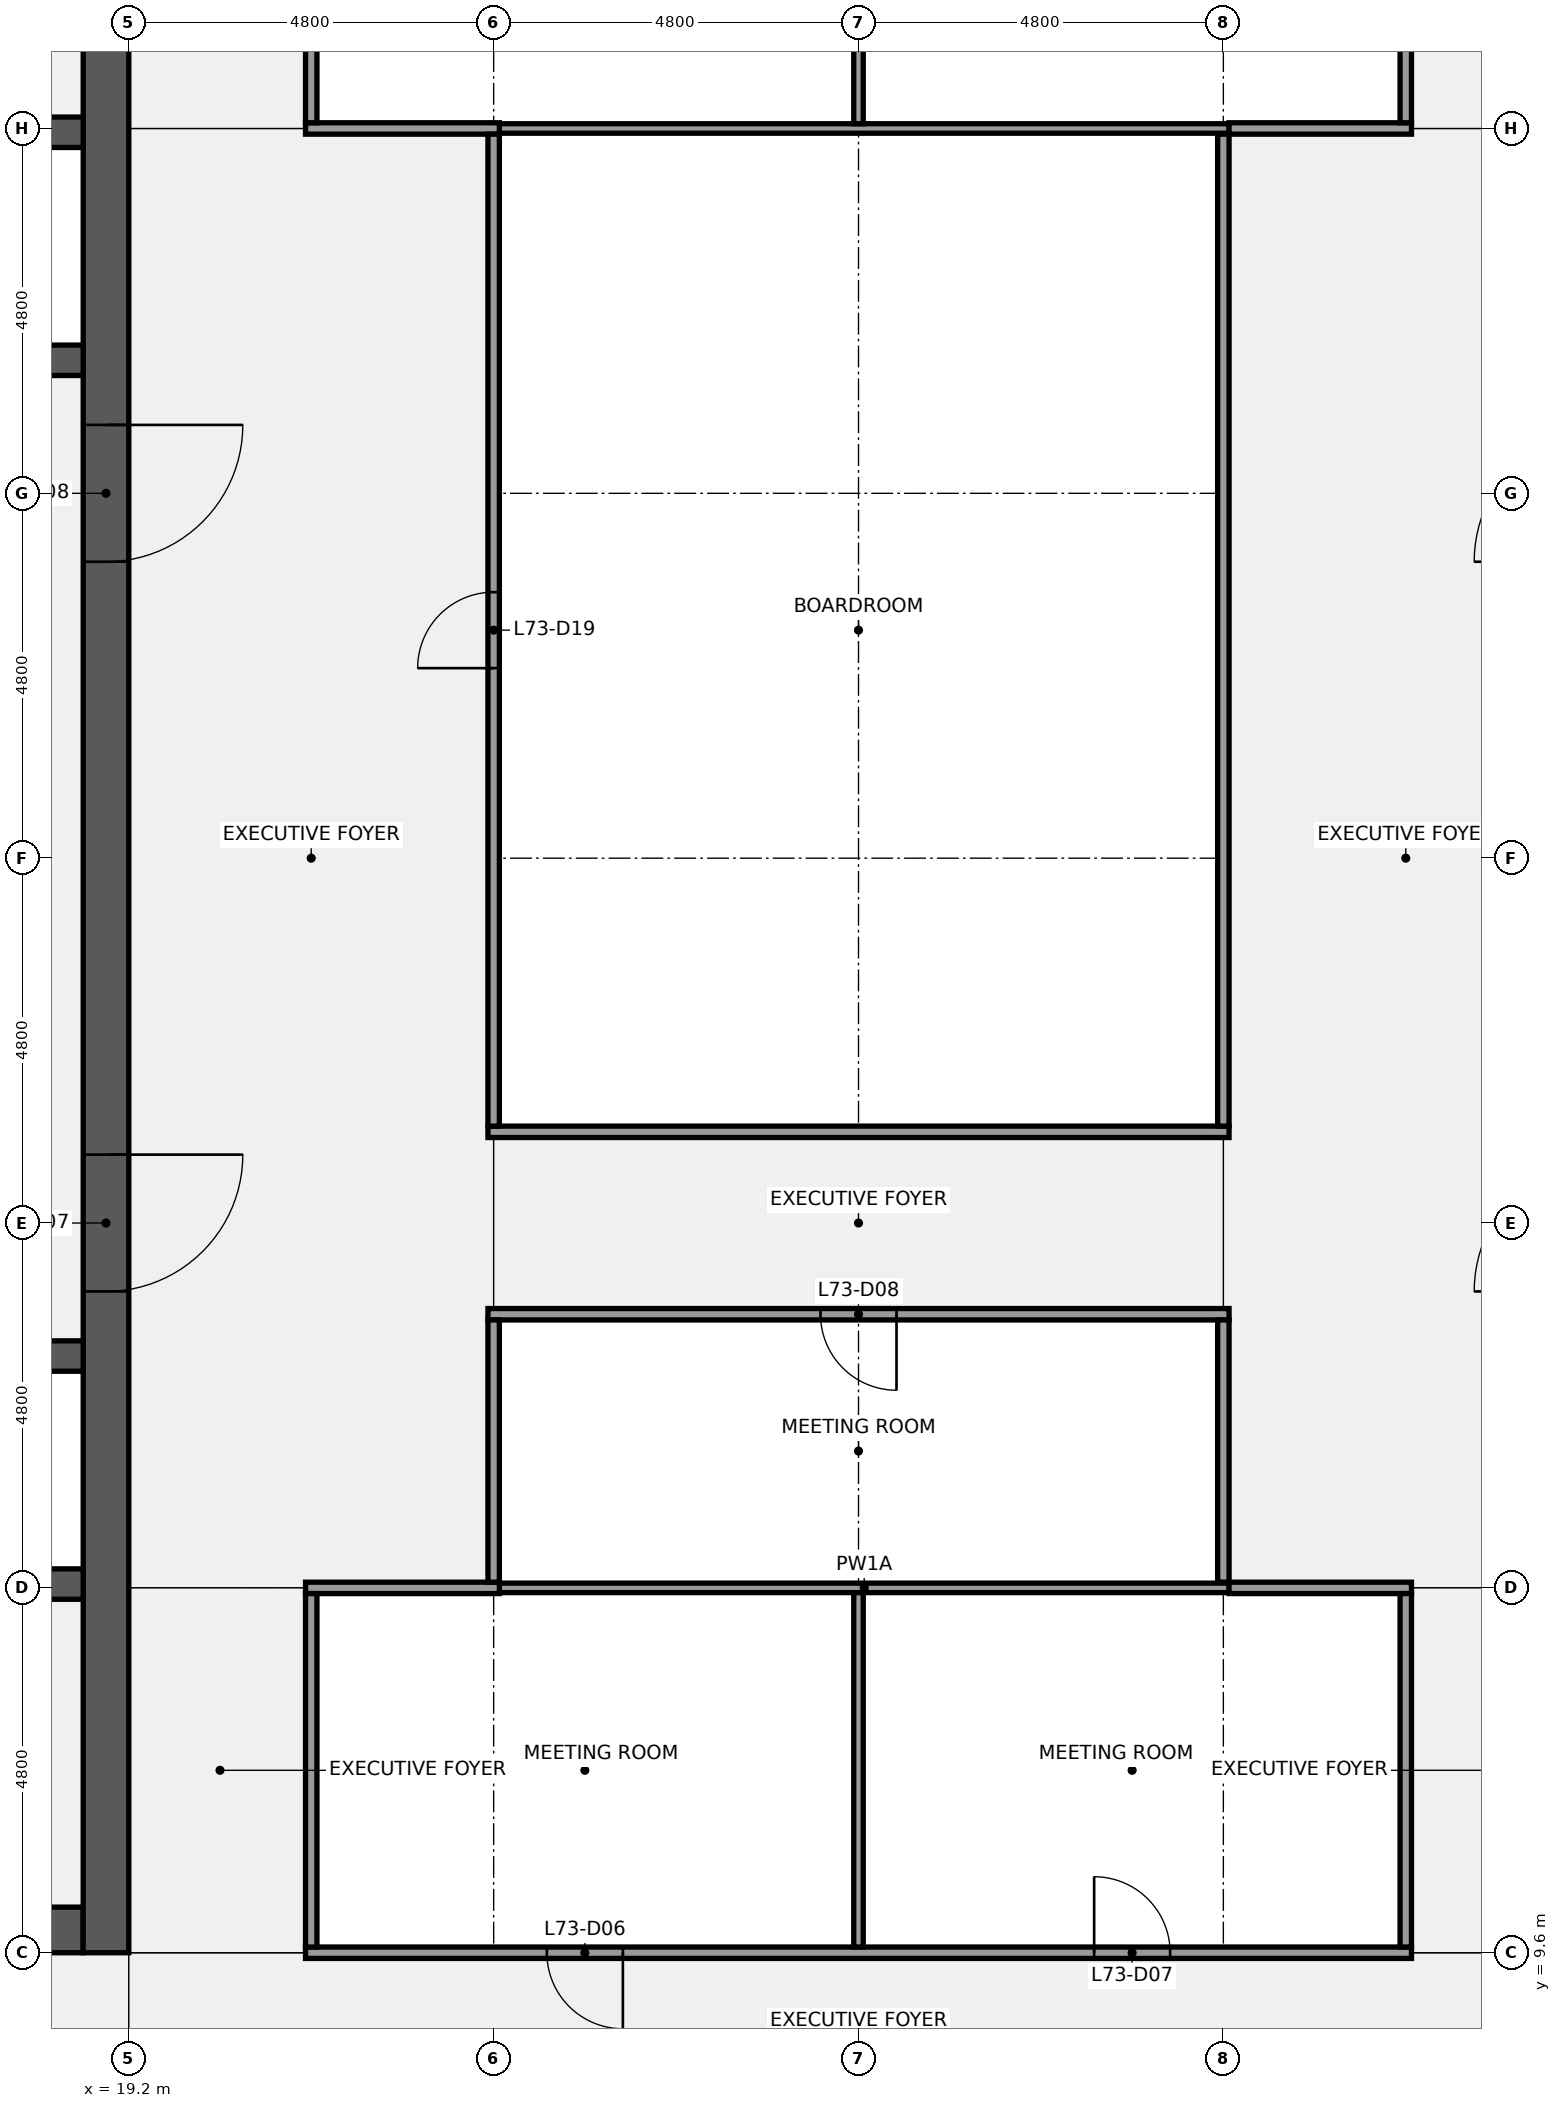
"""IFC4 building model, lengths in metres.
Left out: names, types, materials, properties, quantities, classifications, styles, units other than length and angle.
Written with IfcOpenShell. Run it as: python <this file> out.ifc"""

import sys

from ifc_helpers import new_model, si_unit, direction, frame, frame_2d, origin, place, context, subcontext, project, spatial, rectangle, extrude, element, fill, save


model = new_model("IFC4")
c1 = context("Model", 3, precision=1e-05, world=origin(), true_north=direction((0.0, 1.0)))
c2 = subcontext(c1, "Body", "Model", "MODEL_VIEW")
j1 = project(units=[si_unit("LENGTHUNIT", "METRE"), si_unit("PLANEANGLEUNIT", "RADIAN")], contexts=[c1])
p1 = place(None, origin())
s1 = spatial("IfcSite", under=j1, at=p1, CompositionType="ELEMENT")
p2 = place(p1, origin())
s2 = spatial("IfcBuilding", under=s1, at=p2, CompositionType="ELEMENT")
p3 = place(p2, frame((0.0, 0.0, 330.3)))
s3 = spatial("IfcBuildingStorey", under=s2, at=p3, CompositionType="ELEMENT", Elevation=330.3)
p4 = place(p3, frame((18.6, 9.9, 0.0), z_axis=(0.0, 0.0, 1.0), x_axis=(-1.0, 0.0, 0.0)))
e1 = element("IfcWall", 1, at=p4, inside=s3, PredefinedType="SHEAR", context=c2, shape_type="SweptSolid", body=[
    extrude(rectangle(XDim=4.2, YDim=0.6, at=frame_2d((2.1, 0.0))), origin(), (0.0, 0.0, 1.0), 3.84),
])
p5 = place(p4, frame((1.25, 0.0, 0.0)))
e2 = element("IfcOpeningElement", 2, at=p5, cuts=e1, PredefinedType="OPENING", context=c2, shape_type="SweptSolid", body=[
    extrude(rectangle(XDim=1.1, YDim=2.1, at=frame_2d((0.55, 1.05))), frame((0.0, 0.31, 0.0), z_axis=(0.0, -1.0, 0.0), x_axis=(1.0, 0.0, 0.0)), (0.0, 0.0, 1.0), 0.62),
])
p6 = place(p3, frame((18.9, 38.4, 0.0), z_axis=(0.0, 0.0, 1.0), x_axis=(0.0, -1.0, 0.0)))
e3 = element("IfcWall", 3, at=p6, inside=s3, PredefinedType="SHEAR", context=c2, shape_type="SweptSolid", body=[
    extrude(rectangle(XDim=28.8, YDim=0.6, at=frame_2d((14.4, 0.0))), origin(), (0.0, 0.0, 1.0), 3.84),
])
p7 = place(p6, frame((18.3, 0.0, 0.0)))
e4 = element("IfcOpeningElement", 4, at=p7, cuts=e3, PredefinedType="OPENING", context=c2, shape_type="SweptSolid", body=[
    extrude(rectangle(XDim=1.8, YDim=2.1, at=frame_2d((0.9, 1.05))), frame((0.0, 0.31, 0.0), z_axis=(0.0, -1.0, 0.0), x_axis=(1.0, 0.0, 0.0)), (0.0, 0.0, 1.0), 0.62),
])
p8 = place(p6, frame((8.7, 0.0, 0.0)))
e5 = element("IfcOpeningElement", 5, at=p8, cuts=e3, PredefinedType="OPENING", context=c2, shape_type="SweptSolid", body=[
    extrude(rectangle(XDim=1.8, YDim=2.1, at=frame_2d((0.9, 1.05))), frame((0.0, 0.31, 0.0), z_axis=(0.0, -1.0, 0.0), x_axis=(1.0, 0.0, 0.0)), (0.0, 0.0, 1.0), 0.62),
])
p9 = place(p3, frame((0.6, 14.45, 0.0), z_axis=(0.0, 0.0, 1.0), x_axis=(1.0, 0.0, 0.0)))
e6 = element("IfcWall", 6, at=p9, inside=s3, PredefinedType="SHEAR", context=c2, shape_type="SweptSolid", body=[
    extrude(rectangle(XDim=18.0, YDim=0.4, at=frame_2d((9.0, 0.0))), origin(), (0.0, 0.0, 1.0), 3.84),
])
p10 = place(p3, frame((0.6, 17.45, 0.0), z_axis=(0.0, 0.0, 1.0), x_axis=(1.0, 0.0, 0.0)))
e7 = element("IfcWall", 7, at=p10, inside=s3, PredefinedType="SHEAR", context=c2, shape_type="SweptSolid", body=[
    extrude(rectangle(XDim=18.0, YDim=0.4, at=frame_2d((9.0, 0.0))), origin(), (0.0, 0.0, 1.0), 3.84),
])
p11 = place(p10, frame((1.863, 0.0, 0.0)))
e8 = element("IfcOpeningElement", 8, at=p11, cuts=e7, PredefinedType="OPENING", context=c2, shape_type="SweptSolid", body=[
    extrude(rectangle(XDim=1.0, YDim=2.1, at=frame_2d((0.5, 1.05))), frame((0.0, 0.21, 0.0), z_axis=(0.0, -1.0, 0.0), x_axis=(1.0, 0.0, 0.0)), (0.0, 0.0, 1.0), 0.42),
])
p12 = place(p10, frame((6.1, 0.0, 0.0)))
e9 = element("IfcOpeningElement", 9, at=p12, cuts=e7, PredefinedType="OPENING", context=c2, shape_type="SweptSolid", body=[
    extrude(rectangle(XDim=1.0, YDim=2.1, at=frame_2d((0.5, 1.05))), frame((0.0, 0.21, 0.0), z_axis=(0.0, -1.0, 0.0), x_axis=(1.0, 0.0, 0.0)), (0.0, 0.0, 1.0), 0.42),
])
p13 = place(p10, frame((9.4, 0.0, 0.0)))
e10 = element("IfcOpeningElement", 10, at=p13, cuts=e7, PredefinedType="OPENING", context=c2, shape_type="SweptSolid", body=[
    extrude(rectangle(XDim=1.0, YDim=2.1, at=frame_2d((0.5, 1.05))), frame((0.0, 0.21, 0.0), z_axis=(0.0, -1.0, 0.0), x_axis=(1.0, 0.0, 0.0)), (0.0, 0.0, 1.0), 0.42),
])
p14 = place(p10, frame((12.1, 0.0, 0.0)))
e11 = element("IfcOpeningElement", 11, at=p14, cuts=e7, PredefinedType="OPENING", context=c2, shape_type="SweptSolid", body=[
    extrude(rectangle(XDim=1.0, YDim=2.1, at=frame_2d((0.5, 1.05))), frame((0.0, 0.21, 0.0), z_axis=(0.0, -1.0, 0.0), x_axis=(1.0, 0.0, 0.0)), (0.0, 0.0, 1.0), 0.42),
])
p15 = place(p10, frame((15.438, 0.0, 0.0)))
e12 = element("IfcOpeningElement", 12, at=p15, cuts=e7, PredefinedType="OPENING", context=c2, shape_type="SweptSolid", body=[
    extrude(rectangle(XDim=1.0, YDim=2.1, at=frame_2d((0.5, 1.05))), frame((0.0, 0.21, 0.0), z_axis=(0.0, -1.0, 0.0), x_axis=(1.0, 0.0, 0.0)), (0.0, 0.0, 1.0), 0.42),
])
p16 = place(p3, frame((0.6, 30.55, 0.0), z_axis=(0.0, 0.0, 1.0), x_axis=(1.0, 0.0, 0.0)))
e13 = element("IfcWall", 13, at=p16, inside=s3, PredefinedType="SHEAR", context=c2, shape_type="SweptSolid", body=[
    extrude(rectangle(XDim=18.0, YDim=0.4, at=frame_2d((9.0, 0.0))), origin(), (0.0, 0.0, 1.0), 3.84),
])
p17 = place(p16, frame((1.6, 0.0, 0.0)))
e14 = element("IfcOpeningElement", 14, at=p17, cuts=e13, PredefinedType="OPENING", context=c2, shape_type="SweptSolid", body=[
    extrude(rectangle(XDim=1.2, YDim=2.1, at=frame_2d((0.6, 1.05))), frame((0.0, 0.21, 0.0), z_axis=(0.0, -1.0, 0.0), x_axis=(1.0, 0.0, 0.0)), (0.0, 0.0, 1.0), 0.42),
])
p18 = place(p16, frame((4.2, 0.0, 0.0)))
e15 = element("IfcOpeningElement", 15, at=p18, cuts=e13, PredefinedType="OPENING", context=c2, shape_type="SweptSolid", body=[
    extrude(rectangle(XDim=1.2, YDim=2.1, at=frame_2d((0.6, 1.05))), frame((0.0, 0.21, 0.0), z_axis=(0.0, -1.0, 0.0), x_axis=(1.0, 0.0, 0.0)), (0.0, 0.0, 1.0), 0.42),
])
p19 = place(p16, frame((6.8, 0.0, 0.0)))
e16 = element("IfcOpeningElement", 16, at=p19, cuts=e13, PredefinedType="OPENING", context=c2, shape_type="SweptSolid", body=[
    extrude(rectangle(XDim=1.2, YDim=2.1, at=frame_2d((0.6, 1.05))), frame((0.0, 0.21, 0.0), z_axis=(0.0, -1.0, 0.0), x_axis=(1.0, 0.0, 0.0)), (0.0, 0.0, 1.0), 0.42),
])
p20 = place(p16, frame((10.0, 0.0, 0.0)))
e17 = element("IfcOpeningElement", 17, at=p20, cuts=e13, PredefinedType="OPENING", context=c2, shape_type="SweptSolid", body=[
    extrude(rectangle(XDim=1.2, YDim=2.1, at=frame_2d((0.6, 1.05))), frame((0.0, 0.21, 0.0), z_axis=(0.0, -1.0, 0.0), x_axis=(1.0, 0.0, 0.0)), (0.0, 0.0, 1.0), 0.42),
])
p21 = place(p16, frame((12.6, 0.0, 0.0)))
e18 = element("IfcOpeningElement", 18, at=p21, cuts=e13, PredefinedType="OPENING", context=c2, shape_type="SweptSolid", body=[
    extrude(rectangle(XDim=1.2, YDim=2.1, at=frame_2d((0.6, 1.05))), frame((0.0, 0.21, 0.0), z_axis=(0.0, -1.0, 0.0), x_axis=(1.0, 0.0, 0.0)), (0.0, 0.0, 1.0), 0.42),
])
p22 = place(p16, frame((15.2, 0.0, 0.0)))
e19 = element("IfcOpeningElement", 19, at=p22, cuts=e13, PredefinedType="OPENING", context=c2, shape_type="SweptSolid", body=[
    extrude(rectangle(XDim=1.2, YDim=2.1, at=frame_2d((0.6, 1.05))), frame((0.0, 0.21, 0.0), z_axis=(0.0, -1.0, 0.0), x_axis=(1.0, 0.0, 0.0)), (0.0, 0.0, 1.0), 0.42),
])
p23 = place(p3, frame((0.6, 33.55, 0.0), z_axis=(0.0, 0.0, 1.0), x_axis=(1.0, 0.0, 0.0)))
e20 = element("IfcWall", 20, at=p23, inside=s3, PredefinedType="SHEAR", context=c2, shape_type="SweptSolid", body=[
    extrude(rectangle(XDim=18.0, YDim=0.4, at=frame_2d((9.0, 0.0))), origin(), (0.0, 0.0, 1.0), 3.84),
])
p24 = place(p3, frame((21.525, 9.6, 0.0), z_axis=(0.0, 0.0, 1.0), x_axis=(1.0, 0.0, 0.0)))
e21 = element("IfcWall", 21, at=p24, inside=s3, PredefinedType="PARTITIONING", context=c2, shape_type="SweptSolid", body=[
    extrude(rectangle(XDim=14.55, YDim=0.15, at=frame_2d((7.275, 0.0))), origin(), (0.0, 0.0, 1.0), 2.87),
])
p25 = place(p24, frame((3.175, 0.0, 0.0)))
e22 = element("IfcOpeningElement", 22, at=p25, cuts=e21, PredefinedType="OPENING", context=c2, shape_type="SweptSolid", body=[
    extrude(rectangle(XDim=1.0, YDim=2.1, at=frame_2d((0.5, 1.05))), frame((0.0, 0.085, 0.0), z_axis=(0.0, -1.0, 0.0), x_axis=(1.0, 0.0, 0.0)), (0.0, 0.0, 1.0), 0.17),
])
p26 = place(p24, frame((10.375, 0.0, 0.0)))
e23 = element("IfcOpeningElement", 23, at=p26, cuts=e21, PredefinedType="OPENING", context=c2, shape_type="SweptSolid", body=[
    extrude(rectangle(XDim=1.0, YDim=2.1, at=frame_2d((0.5, 1.05))), frame((0.0, 0.085, 0.0), z_axis=(0.0, -1.0, 0.0), x_axis=(1.0, 0.0, 0.0)), (0.0, 0.0, 1.0), 0.17),
])
p27 = place(p3, frame((24.075, 14.4, 0.0), z_axis=(0.0, 0.0, 1.0), x_axis=(1.0, 0.0, 0.0)))
e24 = element("IfcWall", 24, at=p27, inside=s3, PredefinedType="PARTITIONING", context=c2, shape_type="SweptSolid", body=[
    extrude(rectangle(XDim=9.6, YDim=0.125, at=frame_2d((4.8, 0.0))), origin(), (0.0, 0.0, 1.0), 2.87),
])
p28 = place(p3, frame((21.525, 14.4, 0.0), z_axis=(0.0, 0.0, 1.0), x_axis=(1.0, 0.0, 0.0)))
e25 = element("IfcWall", 25, at=p28, inside=s3, PredefinedType="PARTITIONING", context=c2, shape_type="SweptSolid", body=[
    extrude(rectangle(XDim=2.55, YDim=0.15, at=frame_2d((1.275, 0.0))), origin(), (0.0, 0.0, 1.0), 2.87),
])
p29 = place(p3, frame((33.675, 14.4, 0.0), z_axis=(0.0, 0.0, 1.0), x_axis=(1.0, 0.0, 0.0)))
e26 = element("IfcWall", 26, at=p29, inside=s3, PredefinedType="PARTITIONING", context=c2, shape_type="SweptSolid", body=[
    extrude(rectangle(XDim=2.4, YDim=0.15, at=frame_2d((1.2, 0.0))), origin(), (0.0, 0.0, 1.0), 2.87),
])
p30 = place(p3, frame((23.925, 18.0, 0.0), z_axis=(0.0, 0.0, 1.0), x_axis=(1.0, 0.0, 0.0)))
e27 = element("IfcWall", 27, at=p30, inside=s3, PredefinedType="PARTITIONING", context=c2, shape_type="SweptSolid", body=[
    extrude(rectangle(XDim=9.75, YDim=0.15, at=frame_2d((4.875, 0.0))), origin(), (0.0, 0.0, 1.0), 2.87),
])
p31 = place(p30, frame((4.375, 0.0, 0.0)))
e28 = element("IfcOpeningElement", 28, at=p31, cuts=e27, PredefinedType="OPENING", context=c2, shape_type="SweptSolid", body=[
    extrude(rectangle(XDim=1.0, YDim=2.1, at=frame_2d((0.5, 1.05))), frame((0.0, 0.085, 0.0), z_axis=(0.0, -1.0, 0.0), x_axis=(1.0, 0.0, 0.0)), (0.0, 0.0, 1.0), 0.17),
])
p32 = place(p3, frame((23.925, 20.4, 0.0), z_axis=(0.0, 0.0, 1.0), x_axis=(1.0, 0.0, 0.0)))
e29 = element("IfcWall", 29, at=p32, inside=s3, PredefinedType="PARTITIONING", context=c2, shape_type="SweptSolid", body=[
    extrude(rectangle(XDim=9.75, YDim=0.15, at=frame_2d((4.875, 0.0))), origin(), (0.0, 0.0, 1.0), 2.87),
])
p33 = place(p3, frame((24.075, 33.6, 0.0), z_axis=(0.0, 0.0, 1.0), x_axis=(1.0, 0.0, 0.0)))
e30 = element("IfcWall", 30, at=p33, inside=s3, PredefinedType="PARTITIONING", context=c2, shape_type="SweptSolid", body=[
    extrude(rectangle(XDim=9.6, YDim=0.125, at=frame_2d((4.8, 0.0))), origin(), (0.0, 0.0, 1.0), 2.87),
])
p34 = place(p3, frame((21.525, 33.6, 0.0), z_axis=(0.0, 0.0, 1.0), x_axis=(1.0, 0.0, 0.0)))
e31 = element("IfcWall", 31, at=p34, inside=s3, PredefinedType="PARTITIONING", context=c2, shape_type="SweptSolid", body=[
    extrude(rectangle(XDim=2.55, YDim=0.15, at=frame_2d((1.275, 0.0))), origin(), (0.0, 0.0, 1.0), 2.87),
])
p35 = place(p3, frame((33.675, 33.6, 0.0), z_axis=(0.0, 0.0, 1.0), x_axis=(1.0, 0.0, 0.0)))
e32 = element("IfcWall", 32, at=p35, inside=s3, PredefinedType="PARTITIONING", context=c2, shape_type="SweptSolid", body=[
    extrude(rectangle(XDim=2.4, YDim=0.15, at=frame_2d((1.2, 0.0))), origin(), (0.0, 0.0, 1.0), 2.87),
])
for number, where, z_axis, x_axis in (
    (33, (21.6, 9.675, 0.0), (0.0, 0.0, 1.0), (0.0, 1.0, 0.0)),
    (34, (21.6, 33.675, 0.0), (0.0, 0.0, 1.0), (0.0, 1.0, 0.0)),
):
    element("IfcWall", number, at=place(p3, frame(where, z_axis=z_axis, x_axis=x_axis)), inside=s3, PredefinedType="PARTITIONING", context=c2, shape_type="SweptSolid", body=[
        extrude(rectangle(XDim=4.65, YDim=0.15, at=frame_2d((2.325, 0.0))), origin(), (0.0, 0.0, 1.0), 2.87),
    ])
p36 = place(p3, frame((24.0, 14.475, 0.0), z_axis=(0.0, 0.0, 1.0), x_axis=(0.0, 1.0, 0.0)))
e35 = element("IfcWall", 35, at=p36, inside=s3, PredefinedType="PARTITIONING", context=c2, shape_type="SweptSolid", body=[
    extrude(rectangle(XDim=3.45, YDim=0.15, at=frame_2d((1.725, 0.0))), origin(), (0.0, 0.0, 1.0), 2.87),
])
p37 = place(p3, frame((24.0, 20.475, 0.0), z_axis=(0.0, 0.0, 1.0), x_axis=(0.0, 1.0, 0.0)))
e36 = element("IfcWall", 36, at=p37, inside=s3, PredefinedType="PARTITIONING", context=c2, shape_type="SweptSolid", body=[
    extrude(rectangle(XDim=13.05, YDim=0.15, at=frame_2d((6.525, 0.0))), origin(), (0.0, 0.0, 1.0), 2.87),
])
p38 = place(p37, frame((6.025, 0.0, 0.0)))
e37 = element("IfcOpeningElement", 37, at=p38, cuts=e36, PredefinedType="OPENING", context=c2, shape_type="SweptSolid", body=[
    extrude(rectangle(XDim=1.0, YDim=2.1, at=frame_2d((0.5, 1.05))), frame((0.0, 0.085, 0.0), z_axis=(0.0, -1.0, 0.0), x_axis=(1.0, 0.0, 0.0)), (0.0, 0.0, 1.0), 0.17),
])
for number, where, z_axis, x_axis in (
    (38, (28.8, 9.675, 0.0), (0.0, 0.0, 1.0), (0.0, 1.0, 0.0)),
    (39, (28.8, 33.663, 0.0), (0.0, 0.0, 1.0), (0.0, 1.0, 0.0)),
):
    element("IfcWall", number, at=place(p3, frame(where, z_axis=z_axis, x_axis=x_axis)), inside=s3, PredefinedType="PARTITIONING", context=c2, shape_type="SweptSolid", body=[
        extrude(rectangle(XDim=4.662, YDim=0.125, at=frame_2d((2.331, 0.0))), origin(), (0.0, 0.0, 1.0), 2.87),
    ])
p39 = place(p3, frame((33.6, 14.475, 0.0), z_axis=(0.0, 0.0, 1.0), x_axis=(0.0, 1.0, 0.0)))
e40 = element("IfcWall", 40, at=p39, inside=s3, PredefinedType="PARTITIONING", context=c2, shape_type="SweptSolid", body=[
    extrude(rectangle(XDim=3.45, YDim=0.15, at=frame_2d((1.725, 0.0))), origin(), (0.0, 0.0, 1.0), 2.87),
])
p40 = place(p3, frame((33.6, 20.475, 0.0), z_axis=(0.0, 0.0, 1.0), x_axis=(0.0, 1.0, 0.0)))
e41 = element("IfcWall", 41, at=p40, inside=s3, PredefinedType="PARTITIONING", context=c2, shape_type="SweptSolid", body=[
    extrude(rectangle(XDim=13.05, YDim=0.15, at=frame_2d((6.525, 0.0))), origin(), (0.0, 0.0, 1.0), 2.87),
])
for number, where, z_axis, x_axis in (
    (42, (36.0, 9.675, 0.0), (0.0, 0.0, 1.0), (0.0, 1.0, 0.0)),
    (43, (36.0, 33.675, 0.0), (0.0, 0.0, 1.0), (0.0, 1.0, 0.0)),
):
    element("IfcWall", number, at=place(p3, frame(where, z_axis=z_axis, x_axis=x_axis)), inside=s3, PredefinedType="PARTITIONING", context=c2, shape_type="SweptSolid", body=[
        extrude(rectangle(XDim=4.65, YDim=0.15, at=frame_2d((2.325, 0.0))), origin(), (0.0, 0.0, 1.0), 2.87),
    ])
p41 = place(p7, origin())
e44 = element("IfcDoor", 44, at=p41, inside=s3, OperationType="DOUBLE_DOOR_SINGLE_SWING", PredefinedType="DOOR", context=c2, shape_type="SweptSolid", body=[
    extrude(rectangle(XDim=1.8, YDim=2.1, at=frame_2d((0.9, 1.05))), frame((0.0, 0.025, 0.0), z_axis=(0.0, -1.0, 0.0), x_axis=(1.0, 0.0, 0.0)), (0.0, 0.0, 1.0), 0.05),
])
fill(e4, e44)
p42 = place(p8, origin())
e45 = element("IfcDoor", 45, at=p42, inside=s3, OperationType="DOUBLE_DOOR_SINGLE_SWING", PredefinedType="DOOR", context=c2, shape_type="SweptSolid", body=[
    extrude(rectangle(XDim=1.8, YDim=2.1, at=frame_2d((0.9, 1.05))), frame((0.0, 0.025, 0.0), z_axis=(0.0, -1.0, 0.0), x_axis=(1.0, 0.0, 0.0)), (0.0, 0.0, 1.0), 0.05),
])
fill(e5, e45)
p43 = place(p25, origin())
e46 = element("IfcDoor", 46, at=p43, inside=s3, OperationType="SINGLE_SWING_RIGHT", PredefinedType="DOOR", context=c2, shape_type="SweptSolid", body=[
    extrude(rectangle(XDim=1.0, YDim=2.1, at=frame_2d((0.5, 1.05))), frame((0.0, 0.025, 0.0), z_axis=(0.0, -1.0, 0.0), x_axis=(1.0, 0.0, 0.0)), (0.0, 0.0, 1.0), 0.05),
])
fill(e22, e46)
p44 = place(p26, origin())
e47 = element("IfcDoor", 47, at=p44, inside=s3, OperationType="SINGLE_SWING_LEFT", PredefinedType="DOOR", context=c2, shape_type="SweptSolid", body=[
    extrude(rectangle(XDim=1.0, YDim=2.1, at=frame_2d((0.5, 1.05))), frame((0.0, 0.025, 0.0), z_axis=(0.0, -1.0, 0.0), x_axis=(1.0, 0.0, 0.0)), (0.0, 0.0, 1.0), 0.05),
])
fill(e23, e47)
p45 = place(p31, origin())
e48 = element("IfcDoor", 48, at=p45, inside=s3, OperationType="SINGLE_SWING_RIGHT", PredefinedType="DOOR", context=c2, shape_type="SweptSolid", body=[
    extrude(rectangle(XDim=1.0, YDim=2.1, at=frame_2d((0.5, 1.05))), frame((0.0, 0.025, 0.0), z_axis=(0.0, -1.0, 0.0), x_axis=(1.0, 0.0, 0.0)), (0.0, 0.0, 1.0), 0.05),
])
fill(e28, e48)
p46 = place(p38, origin())
e49 = element("IfcDoor", 49, at=p46, inside=s3, OperationType="SINGLE_SWING_LEFT", PredefinedType="DOOR", context=c2, shape_type="SweptSolid", body=[
    extrude(rectangle(XDim=1.0, YDim=2.1, at=frame_2d((0.5, 1.05))), frame((0.0, 0.025, 0.0), z_axis=(0.0, -1.0, 0.0), x_axis=(1.0, 0.0, 0.0)), (0.0, 0.0, 1.0), 0.05),
])
fill(e37, e49)
save(model, sys.argv[1])
